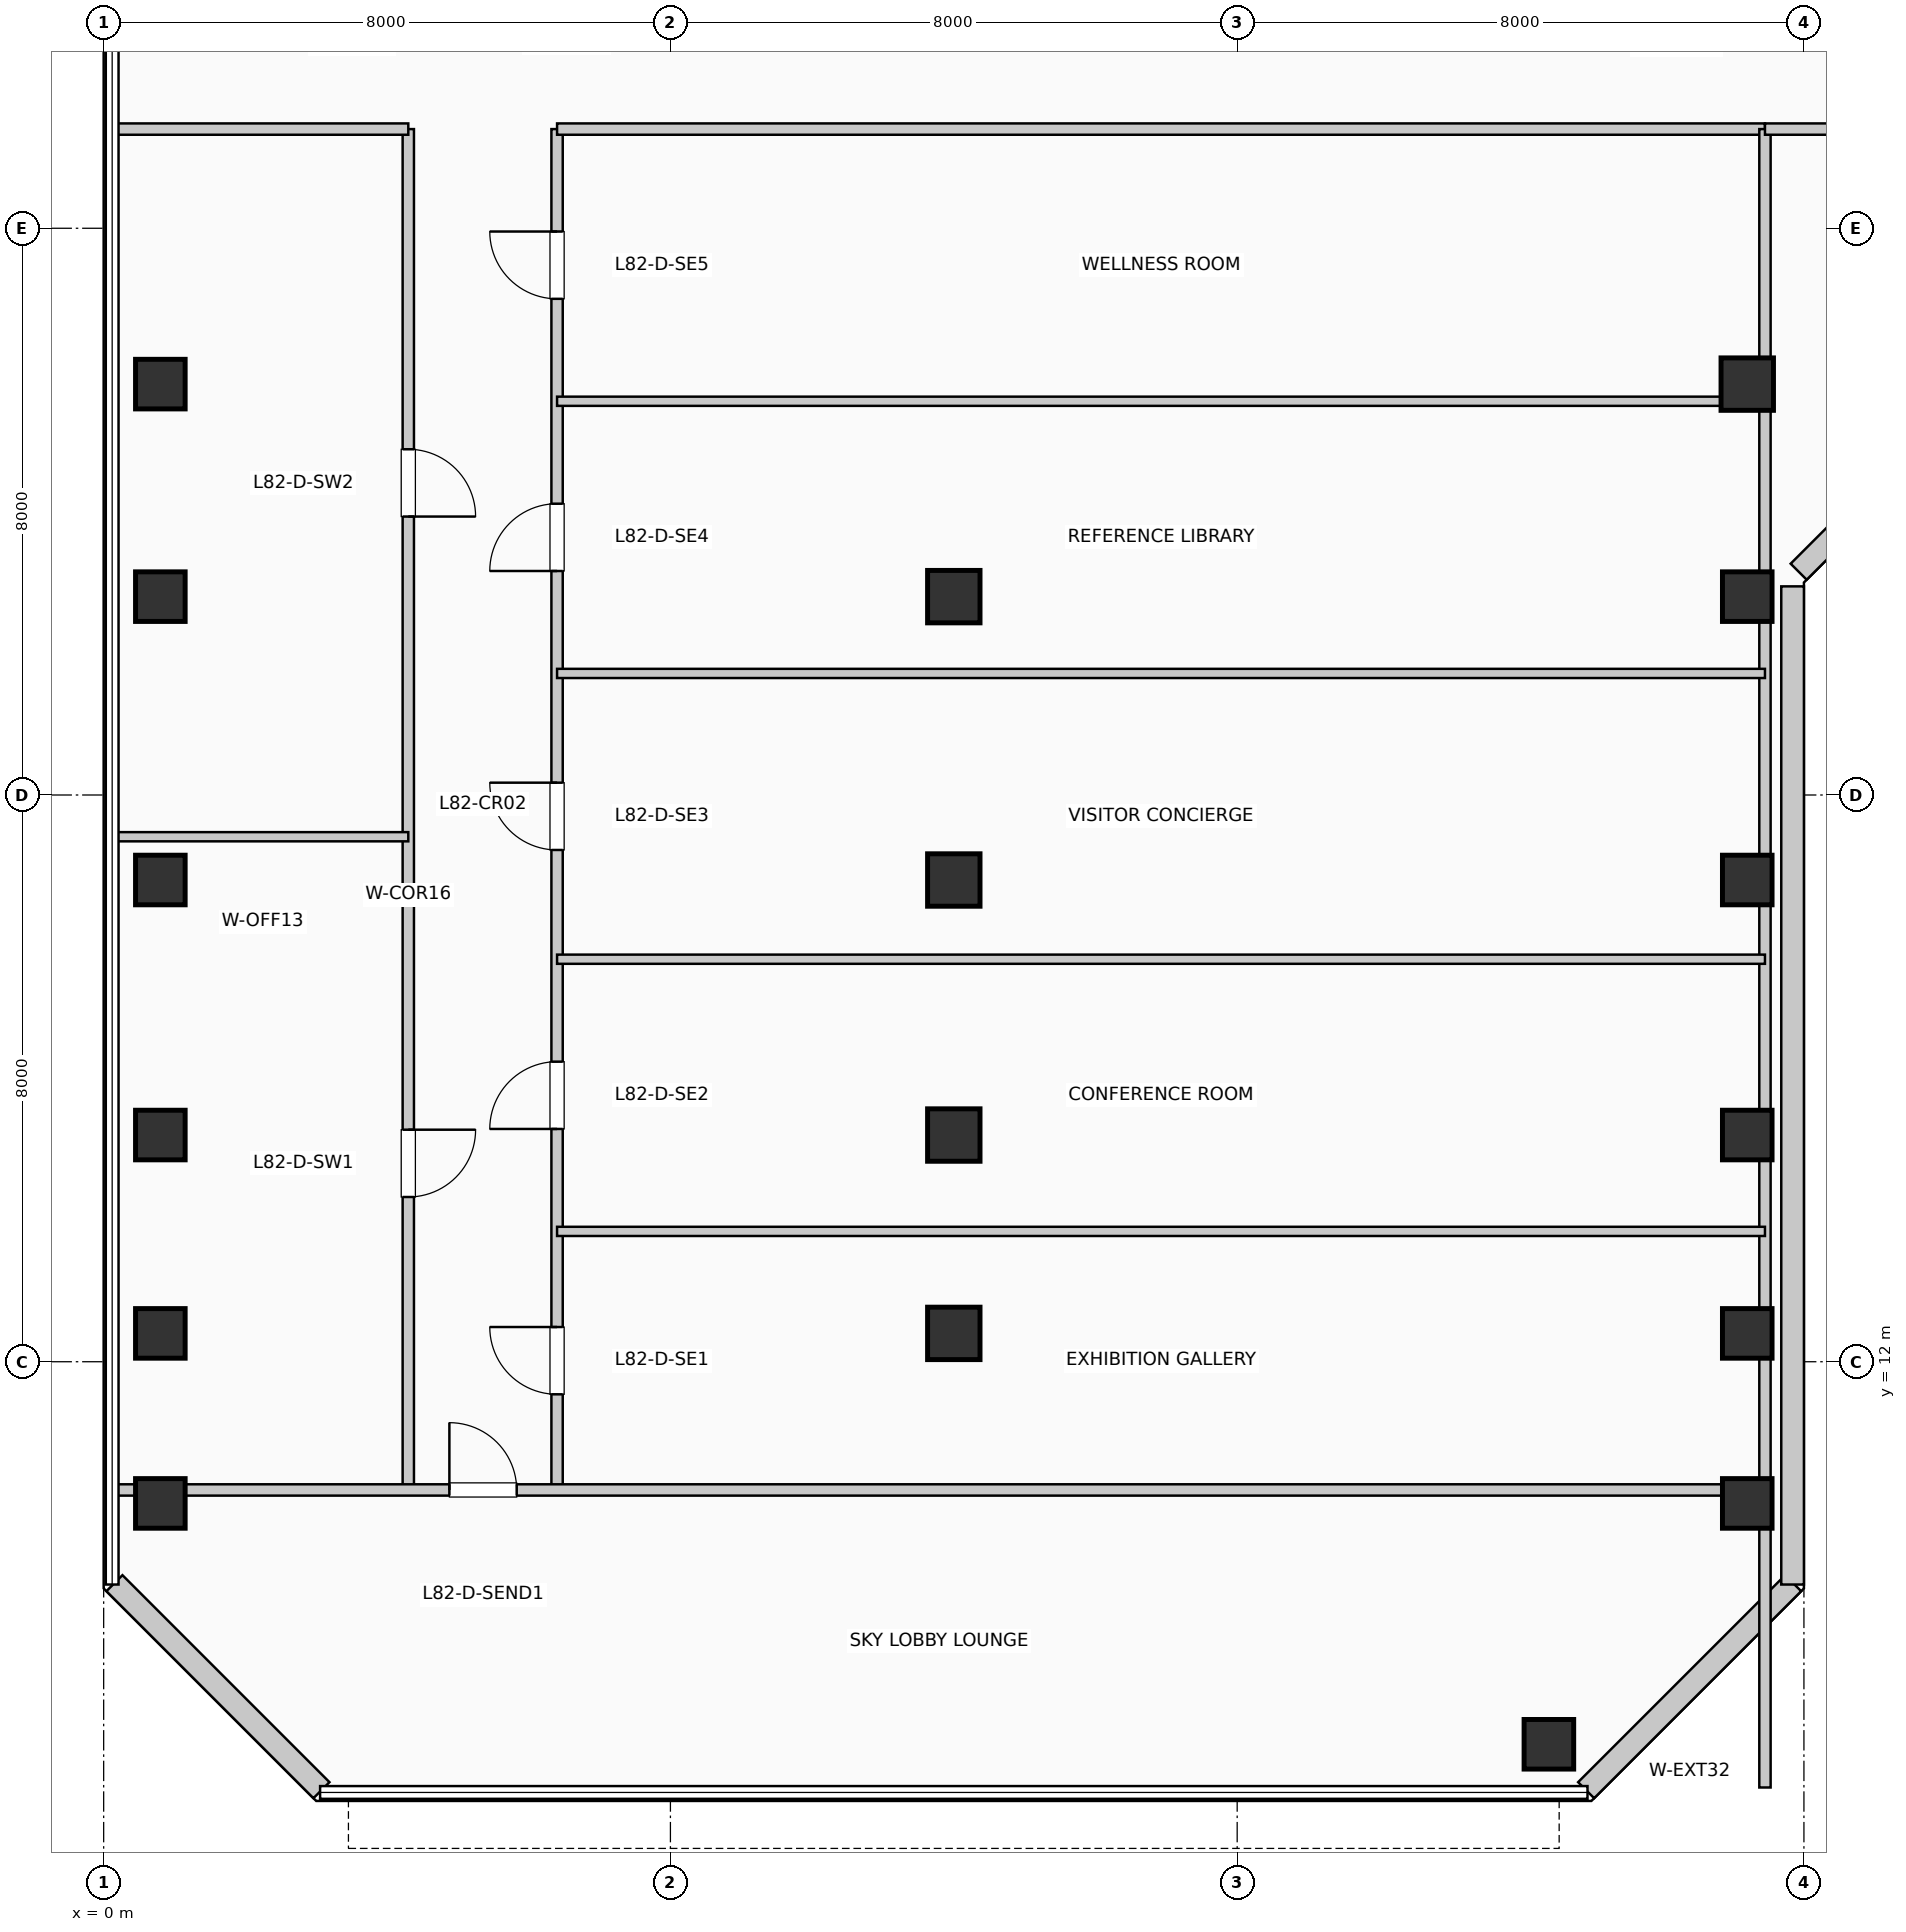
"""IFC4 building model, lengths in metres.
Left out: names, types, materials, properties, quantities, classifications, styles, units other than length and angle.
Written with IfcOpenShell. Run it as: python <this file> out.ifc"""

import sys

from ifc_helpers import new_model, si_unit, direction, frame, frame_2d, origin, origin_2d, place, context, subcontext, project, spatial, rectangle, extrude, element, fill, save


model = new_model("IFC4")
c1 = context("Model", 3, precision=1e-05, world=origin(), true_north=direction((0.0, 1.0)))
c2 = subcontext(c1, "Body", "Model", "MODEL_VIEW")
j1 = project(units=[si_unit("LENGTHUNIT", "METRE"), si_unit("PLANEANGLEUNIT", "RADIAN")], contexts=[c1])
p1 = place(None, origin())
s1 = spatial("IfcSite", under=j1, at=p1, CompositionType="ELEMENT")
p2 = place(p1, origin())
s2 = spatial("IfcBuilding", under=s1, at=p2, CompositionType="ELEMENT")
p3 = place(p2, frame((0.0, 0.0, 335.61)))
s3 = spatial("IfcBuildingStorey", under=s2, at=p3, CompositionType="ELEMENT", Elevation=335.61)
for number, where, z_axis, x_axis in (
    (1, (0.8, 10.0, 0.0), (0.0, 0.0, 1.0), (1.0, 0.0, 0.0)),
    (2, (0.8, 12.4, 0.0), (0.0, 0.0, 1.0), (1.0, 0.0, 0.0)),
    (3, (0.8, 15.2, 0.0), (0.0, 0.0, 1.0), (1.0, 0.0, 0.0)),
    (4, (0.8, 18.8, 0.0), (0.0, 0.0, 1.0), (1.0, 0.0, 0.0)),
    (5, (0.8, 22.8, 0.0), (0.0, 0.0, 1.0), (1.0, 0.0, 0.0)),
    (6, (0.8, 25.8, 0.0), (0.0, 0.0, 1.0), (1.0, 0.0, 0.0)),
):
    element("IfcColumn", number, at=place(p3, frame(where, z_axis=z_axis, x_axis=x_axis)), inside=s3, PredefinedType="COLUMN", context=c2, shape_type="SweptSolid", body=[
        extrude(rectangle(XDim=0.7, YDim=0.7, at=origin_2d()), origin(), (0.0, 0.0, 1.0), 3.96),
    ])
for number, where, z_axis, x_axis in (
    (7, (12.0, 12.4, 0.0), (0.0, 0.0, 1.0), (1.0, 0.0, 0.0)),
    (8, (12.0, 15.2, 0.0), (0.0, 0.0, 1.0), (1.0, 0.0, 0.0)),
    (9, (12.0, 18.8, 0.0), (0.0, 0.0, 1.0), (1.0, 0.0, 0.0)),
    (10, (12.0, 22.8, 0.0), (0.0, 0.0, 1.0), (1.0, 0.0, 0.0)),
):
    element("IfcColumn", number, at=place(p3, frame(where, z_axis=z_axis, x_axis=x_axis)), inside=s3, PredefinedType="COLUMN", context=c2, shape_type="SweptSolid", body=[
        extrude(rectangle(XDim=0.74, YDim=0.74, at=origin_2d()), origin(), (0.0, 0.0, 1.0), 3.96),
    ])
for number, where, z_axis, x_axis in (
    (11, (20.4, 6.6, 0.0), (0.0, 0.0, 1.0), (1.0, 0.0, 0.0)),
    (12, (23.2, 10.0, 0.0), (0.0, 0.0, 1.0), (1.0, 0.0, 0.0)),
    (13, (23.2, 12.4, 0.0), (0.0, 0.0, 1.0), (1.0, 0.0, 0.0)),
    (14, (23.2, 15.2, 0.0), (0.0, 0.0, 1.0), (1.0, 0.0, 0.0)),
    (15, (23.2, 18.8, 0.0), (0.0, 0.0, 1.0), (1.0, 0.0, 0.0)),
    (16, (23.2, 22.8, 0.0), (0.0, 0.0, 1.0), (1.0, 0.0, 0.0)),
):
    element("IfcColumn", number, at=place(p3, frame(where, z_axis=z_axis, x_axis=x_axis)), inside=s3, PredefinedType="COLUMN", context=c2, shape_type="SweptSolid", body=[
        extrude(rectangle(XDim=0.7, YDim=0.7, at=origin_2d()), origin(), (0.0, 0.0, 1.0), 3.96),
    ])
p4 = place(p3, frame((23.2, 25.8, 0.0), z_axis=(0.0, 0.0, 1.0), x_axis=(1.0, 0.0, 0.0)))
e17 = element("IfcColumn", 17, at=p4, inside=s3, PredefinedType="COLUMN", context=c2, shape_type="SweptSolid", body=[
    extrude(rectangle(XDim=0.74, YDim=0.74, at=origin_2d()), origin(), (0.0, 0.0, 1.0), 3.96),
])
p5 = place(p3, frame((20.926, 5.952, 0.0), z_axis=(0.0, 0.0, 1.0), x_axis=(0.707077242712, 0.707136318428, 0.0)))
e18 = element("IfcWall", 18, at=p5, inside=s3, PredefinedType="SOLIDWALL", context=c2, shape_type="SweptSolid", body=[
    extrude(rectangle(XDim=4.133, YDim=0.32, at=frame_2d((2.066, 0.0))), origin(), (0.0, 0.0, 1.0), 3.74),
])
p6 = place(p3, frame((23.84, 8.855, 0.0), z_axis=(0.0, 0.0, 1.0), x_axis=(0.0, 1.0, 0.0)))
e19 = element("IfcWall", 19, at=p6, inside=s3, PredefinedType="SOLIDWALL", context=c2, shape_type="SweptSolid", body=[
    extrude(rectangle(XDim=14.09, YDim=0.32, at=frame_2d((7.045, 0.0))), origin(), (0.0, 0.0, 1.0), 3.74),
])
p7 = place(p3, frame((23.926, 23.152, 0.0), z_axis=(0.0, 0.0, 1.0), x_axis=(0.707106781187, 0.707106781187, 0.0)))
e20 = element("IfcWall", 20, at=p7, inside=s3, PredefinedType="SOLIDWALL", context=c2, shape_type="SweptSolid", body=[
    extrude(rectangle(XDim=2.718, YDim=0.32, at=frame_2d((1.359, 0.0))), origin(), (0.0, 0.0, 1.0), 3.74),
])
p8 = place(p3, frame((0.152, 8.874, 0.0), z_axis=(0.0, 0.0, 1.0), x_axis=(0.707077242712, -0.707136318428, 0.0)))
e21 = element("IfcWall", 21, at=p8, inside=s3, PredefinedType="SOLIDWALL", context=c2, shape_type="SweptSolid", body=[
    extrude(rectangle(XDim=4.133, YDim=0.32, at=frame_2d((2.066, 0.0))), origin(), (0.0, 0.0, 1.0), 3.74),
])
p9 = place(p3, frame((4.3, 10.19, 0.0), z_axis=(0.0, 0.0, 1.0), x_axis=(0.0, 1.0, 0.0)))
e22 = element("IfcWall", 22, at=p9, inside=s3, PredefinedType="PARTITIONING", context=c2, shape_type="SweptSolid", body=[
    extrude(rectangle(XDim=19.21, YDim=0.16, at=frame_2d((9.605, 0.0))), origin(), (0.0, 0.0, 1.0), 3.74),
])
p10 = place(p9, frame((5.085, 0.0, 0.0), z_axis=(0.0, 0.0, 1.0), x_axis=(-1.0, 0.0, 0.0)))
e23 = element("IfcOpeningElement", 23, at=p10, cuts=e22, PredefinedType="OPENING", context=c2, shape_type="SweptSolid", body=[
    extrude(rectangle(XDim=0.95, YDim=2.15, at=frame_2d((0.475, 1.075))), frame((0.0, 0.09, 0.0), z_axis=(0.0, -1.0, 0.0), x_axis=(1.0, 0.0, 0.0)), (0.0, 0.0, 1.0), 0.18),
])
p11 = place(p9, frame((14.69, 0.0, 0.0), z_axis=(0.0, 0.0, 1.0), x_axis=(-1.0, 0.0, 0.0)))
e24 = element("IfcOpeningElement", 24, at=p11, cuts=e22, PredefinedType="OPENING", context=c2, shape_type="SweptSolid", body=[
    extrude(rectangle(XDim=0.95, YDim=2.15, at=frame_2d((0.475, 1.075))), frame((0.0, 0.09, 0.0), z_axis=(0.0, -1.0, 0.0), x_axis=(1.0, 0.0, 0.0)), (0.0, 0.0, 1.0), 0.18),
])
p12 = place(p3, frame((6.4, 10.19, 0.0), z_axis=(0.0, 0.0, 1.0), x_axis=(0.0, 1.0, 0.0)))
e25 = element("IfcWall", 25, at=p12, inside=s3, PredefinedType="PARTITIONING", context=c2, shape_type="SweptSolid", body=[
    extrude(rectangle(XDim=19.21, YDim=0.16, at=frame_2d((9.605, 0.0))), origin(), (0.0, 0.0, 1.0), 3.74),
])
p13 = place(p12, frame((1.35, 0.0, 0.0)))
e26 = element("IfcOpeningElement", 26, at=p13, cuts=e25, PredefinedType="OPENING", context=c2, shape_type="SweptSolid", body=[
    extrude(rectangle(XDim=0.95, YDim=2.15, at=frame_2d((0.475, 1.075))), frame((0.0, 0.09, 0.0), z_axis=(0.0, -1.0, 0.0), x_axis=(1.0, 0.0, 0.0)), (0.0, 0.0, 1.0), 0.18),
])
p14 = place(p12, frame((5.096, 0.0, 0.0)))
e27 = element("IfcOpeningElement", 27, at=p14, cuts=e25, PredefinedType="OPENING", context=c2, shape_type="SweptSolid", body=[
    extrude(rectangle(XDim=0.95, YDim=2.15, at=frame_2d((0.475, 1.075))), frame((0.0, 0.09, 0.0), z_axis=(0.0, -1.0, 0.0), x_axis=(1.0, 0.0, 0.0)), (0.0, 0.0, 1.0), 0.18),
])
p15 = place(p12, frame((9.034, 0.0, 0.0)))
e28 = element("IfcOpeningElement", 28, at=p15, cuts=e25, PredefinedType="OPENING", context=c2, shape_type="SweptSolid", body=[
    extrude(rectangle(XDim=0.95, YDim=2.15, at=frame_2d((0.475, 1.075))), frame((0.0, 0.09, 0.0), z_axis=(0.0, -1.0, 0.0), x_axis=(1.0, 0.0, 0.0)), (0.0, 0.0, 1.0), 0.18),
])
p16 = place(p12, frame((12.972, 0.0, 0.0)))
e29 = element("IfcOpeningElement", 29, at=p16, cuts=e25, PredefinedType="OPENING", context=c2, shape_type="SweptSolid", body=[
    extrude(rectangle(XDim=0.95, YDim=2.15, at=frame_2d((0.475, 1.075))), frame((0.0, 0.09, 0.0), z_axis=(0.0, -1.0, 0.0), x_axis=(1.0, 0.0, 0.0)), (0.0, 0.0, 1.0), 0.18),
])
p17 = place(p12, frame((16.814, 0.0, 0.0)))
e30 = element("IfcOpeningElement", 30, at=p17, cuts=e25, PredefinedType="OPENING", context=c2, shape_type="SweptSolid", body=[
    extrude(rectangle(XDim=0.95, YDim=2.15, at=frame_2d((0.475, 1.075))), frame((0.0, 0.09, 0.0), z_axis=(0.0, -1.0, 0.0), x_axis=(1.0, 0.0, 0.0)), (0.0, 0.0, 1.0), 0.18),
])
p18 = place(p3, frame((0.19, 10.19, 0.0), z_axis=(0.0, 0.0, 1.0), x_axis=(1.0, 0.0, 0.0)))
e31 = element("IfcWall", 31, at=p18, inside=s3, PredefinedType="PARTITIONING", context=c2, shape_type="SweptSolid", body=[
    extrude(rectangle(XDim=23.26, YDim=0.16, at=frame_2d((11.63, 0.0))), origin(), (0.0, 0.0, 1.0), 3.175),
])
p19 = place(p18, frame((4.69, 0.0, 0.0)))
e32 = element("IfcOpeningElement", 32, at=p19, cuts=e31, PredefinedType="OPENING", context=c2, shape_type="SweptSolid", body=[
    extrude(rectangle(XDim=0.95, YDim=2.15, at=frame_2d((0.475, 1.075))), frame((0.0, 0.09, 0.0), z_axis=(0.0, -1.0, 0.0), x_axis=(1.0, 0.0, 0.0)), (0.0, 0.0, 1.0), 0.18),
])
p20 = place(p3, frame((0.19, 29.4, 0.0), z_axis=(0.0, 0.0, 1.0), x_axis=(1.0, 0.0, 0.0)))
e33 = element("IfcWall", 33, at=p20, inside=s3, PredefinedType="PARTITIONING", context=c2, shape_type="SweptSolid", body=[
    extrude(rectangle(XDim=4.11, YDim=0.16, at=frame_2d((2.055, 0.0))), origin(), (0.0, 0.0, 1.0), 3.425),
])
p21 = place(p3, frame((6.4, 29.4, 0.0), z_axis=(0.0, 0.0, 1.0), x_axis=(1.0, 0.0, 0.0)))
e34 = element("IfcWall", 34, at=p21, inside=s3, PredefinedType="PARTITIONING", context=c2, shape_type="SweptSolid", body=[
    extrude(rectangle(XDim=17.05, YDim=0.16, at=frame_2d((8.525, 0.0))), origin(), (0.0, 0.0, 1.0), 3.425),
])
p22 = place(p3, frame((23.45, 5.99, 0.0), z_axis=(0.0, 0.0, 1.0), x_axis=(0.0, 1.0, 0.0)))
e35 = element("IfcWall", 35, at=p22, inside=s3, PredefinedType="PARTITIONING", context=c2, shape_type="SweptSolid", body=[
    extrude(rectangle(XDim=23.41, YDim=0.16, at=frame_2d((11.705, 0.0))), origin(), (0.0, 0.0, 1.0), 3.175),
])
p23 = place(p3, frame((0.19, 19.411, 0.0), z_axis=(0.0, 0.0, 1.0), x_axis=(1.0, 0.0, 0.0)))
e36 = element("IfcWall", 36, at=p23, inside=s3, PredefinedType="PARTITIONING", context=c2, shape_type="SweptSolid", body=[
    extrude(rectangle(XDim=4.11, YDim=0.13, at=frame_2d((2.055, 0.0))), origin(), (0.0, 0.0, 1.0), 3.74),
])
for number, where, z_axis, x_axis in (
    (37, (6.4, 13.84, 0.0), (0.0, 0.0, 1.0), (1.0, 0.0, 0.0)),
    (38, (6.4, 17.682, 0.0), (0.0, 0.0, 1.0), (1.0, 0.0, 0.0)),
    (39, (6.4, 21.716, 0.0), (0.0, 0.0, 1.0), (1.0, 0.0, 0.0)),
):
    element("IfcWall", number, at=place(p3, frame(where, z_axis=z_axis, x_axis=x_axis)), inside=s3, PredefinedType="PARTITIONING", context=c2, shape_type="SweptSolid", body=[
        extrude(rectangle(XDim=17.05, YDim=0.13, at=frame_2d((8.525, 0.0))), origin(), (0.0, 0.0, 1.0), 3.74),
    ])
p24 = place(p3, frame((6.4, 25.558, 0.0), z_axis=(0.0, 0.0, 1.0), x_axis=(1.0, 0.0, 0.0)))
e40 = element("IfcWall", 40, at=p24, inside=s3, PredefinedType="PARTITIONING", context=c2, shape_type="SweptSolid", body=[
    extrude(rectangle(XDim=17.05, YDim=0.13, at=frame_2d((8.525, 0.0))), origin(), (0.0, 0.0, 1.0), 3.175),
])
p25 = place(p3, frame((23.45, 29.4, 0.0), z_axis=(0.0, 0.0, 1.0), x_axis=(1.0, 0.0, 0.0)))
e41 = element("IfcWall", 41, at=p25, inside=s3, PredefinedType="PARTITIONING", context=c2, shape_type="SweptSolid", body=[
    extrude(rectangle(XDim=20.76, YDim=0.16, at=frame_2d((10.38, 0.0))), origin(), (0.0, 0.0, 1.0), 3.425),
])
p26 = place(p25, frame((4.108, 0.0, 0.0), z_axis=(0.0, 0.0, 1.0), x_axis=(-1.0, 0.0, 0.0)))
e42 = element("IfcOpeningElement", 42, at=p26, cuts=e41, PredefinedType="OPENING", context=c2, shape_type="SweptSolid", body=[
    extrude(rectangle(XDim=0.95, YDim=2.15, at=frame_2d((0.475, 1.075))), frame((0.0, 0.09, 0.0), z_axis=(0.0, -1.0, 0.0), x_axis=(1.0, 0.0, 0.0)), (0.0, 0.0, 1.0), 0.18),
])
p27 = place(p25, frame((11.374, 0.0, 0.0), z_axis=(0.0, 0.0, 1.0), x_axis=(-1.0, 0.0, 0.0)))
e43 = element("IfcOpeningElement", 43, at=p27, cuts=e41, PredefinedType="OPENING", context=c2, shape_type="SweptSolid", body=[
    extrude(rectangle(XDim=0.95, YDim=2.15, at=frame_2d((0.475, 1.075))), frame((0.0, 0.09, 0.0), z_axis=(0.0, -1.0, 0.0), x_axis=(1.0, 0.0, 0.0)), (0.0, 0.0, 1.0), 0.18),
])
p28 = place(p25, frame((18.121, 0.0, 0.0), z_axis=(0.0, 0.0, 1.0), x_axis=(-1.0, 0.0, 0.0)))
e44 = element("IfcOpeningElement", 44, at=p28, cuts=e41, PredefinedType="OPENING", context=c2, shape_type="SweptSolid", body=[
    extrude(rectangle(XDim=0.95, YDim=2.15, at=frame_2d((0.475, 1.075))), frame((0.0, 0.09, 0.0), z_axis=(0.0, -1.0, 0.0), x_axis=(1.0, 0.0, 0.0)), (0.0, 0.0, 1.0), 0.18),
])
p29 = place(p19, origin())
e45 = element("IfcDoor", 45, at=p29, inside=s3, OperationType="SINGLE_SWING_LEFT", PredefinedType="DOOR", context=c2, shape_type="SweptSolid", body=[
    extrude(rectangle(XDim=0.95, YDim=2.15, at=frame_2d((0.475, 1.075))), frame((0.0, 0.025, 0.0), z_axis=(0.0, -1.0, 0.0), x_axis=(1.0, 0.0, 0.0)), (0.0, 0.0, 1.0), 0.05),
])
fill(e32, e45)
p30 = place(p10, origin())
e46 = element("IfcDoor", 46, at=p30, inside=s3, OperationType="SINGLE_SWING_RIGHT", PredefinedType="DOOR", context=c2, shape_type="SweptSolid", body=[
    extrude(rectangle(XDim=0.95, YDim=2.15, at=frame_2d((0.475, 1.075))), frame((0.0, 0.025, 0.0), z_axis=(0.0, -1.0, 0.0), x_axis=(1.0, 0.0, 0.0)), (0.0, 0.0, 1.0), 0.05),
])
fill(e23, e46)
p31 = place(p11, origin())
e47 = element("IfcDoor", 47, at=p31, inside=s3, OperationType="SINGLE_SWING_LEFT", PredefinedType="DOOR", context=c2, shape_type="SweptSolid", body=[
    extrude(rectangle(XDim=0.95, YDim=2.15, at=frame_2d((0.475, 1.075))), frame((0.0, 0.025, 0.0), z_axis=(0.0, -1.0, 0.0), x_axis=(1.0, 0.0, 0.0)), (0.0, 0.0, 1.0), 0.05),
])
fill(e24, e47)
p32 = place(p13, origin())
e48 = element("IfcDoor", 48, at=p32, inside=s3, OperationType="SINGLE_SWING_RIGHT", PredefinedType="DOOR", context=c2, shape_type="SweptSolid", body=[
    extrude(rectangle(XDim=0.95, YDim=2.15, at=frame_2d((0.475, 1.075))), frame((0.0, 0.025, 0.0), z_axis=(0.0, -1.0, 0.0), x_axis=(1.0, 0.0, 0.0)), (0.0, 0.0, 1.0), 0.05),
])
fill(e26, e48)
p33 = place(p14, origin())
e49 = element("IfcDoor", 49, at=p33, inside=s3, OperationType="SINGLE_SWING_LEFT", PredefinedType="DOOR", context=c2, shape_type="SweptSolid", body=[
    extrude(rectangle(XDim=0.95, YDim=2.15, at=frame_2d((0.475, 1.075))), frame((0.0, 0.025, 0.0), z_axis=(0.0, -1.0, 0.0), x_axis=(1.0, 0.0, 0.0)), (0.0, 0.0, 1.0), 0.05),
])
fill(e27, e49)
p34 = place(p15, origin())
e50 = element("IfcDoor", 50, at=p34, inside=s3, OperationType="SINGLE_SWING_RIGHT", PredefinedType="DOOR", context=c2, shape_type="SweptSolid", body=[
    extrude(rectangle(XDim=0.95, YDim=2.15, at=frame_2d((0.475, 1.075))), frame((0.0, 0.025, 0.0), z_axis=(0.0, -1.0, 0.0), x_axis=(1.0, 0.0, 0.0)), (0.0, 0.0, 1.0), 0.05),
])
fill(e28, e50)
p35 = place(p16, origin())
e51 = element("IfcDoor", 51, at=p35, inside=s3, OperationType="SINGLE_SWING_LEFT", PredefinedType="DOOR", context=c2, shape_type="SweptSolid", body=[
    extrude(rectangle(XDim=0.95, YDim=2.15, at=frame_2d((0.475, 1.075))), frame((0.0, 0.025, 0.0), z_axis=(0.0, -1.0, 0.0), x_axis=(1.0, 0.0, 0.0)), (0.0, 0.0, 1.0), 0.05),
])
fill(e29, e51)
p36 = place(p17, origin())
e52 = element("IfcDoor", 52, at=p36, inside=s3, OperationType="SINGLE_SWING_RIGHT", PredefinedType="DOOR", context=c2, shape_type="SweptSolid", body=[
    extrude(rectangle(XDim=0.95, YDim=2.15, at=frame_2d((0.475, 1.075))), frame((0.0, 0.025, 0.0), z_axis=(0.0, -1.0, 0.0), x_axis=(1.0, 0.0, 0.0)), (0.0, 0.0, 1.0), 0.05),
])
fill(e30, e52)
save(model, sys.argv[1])
